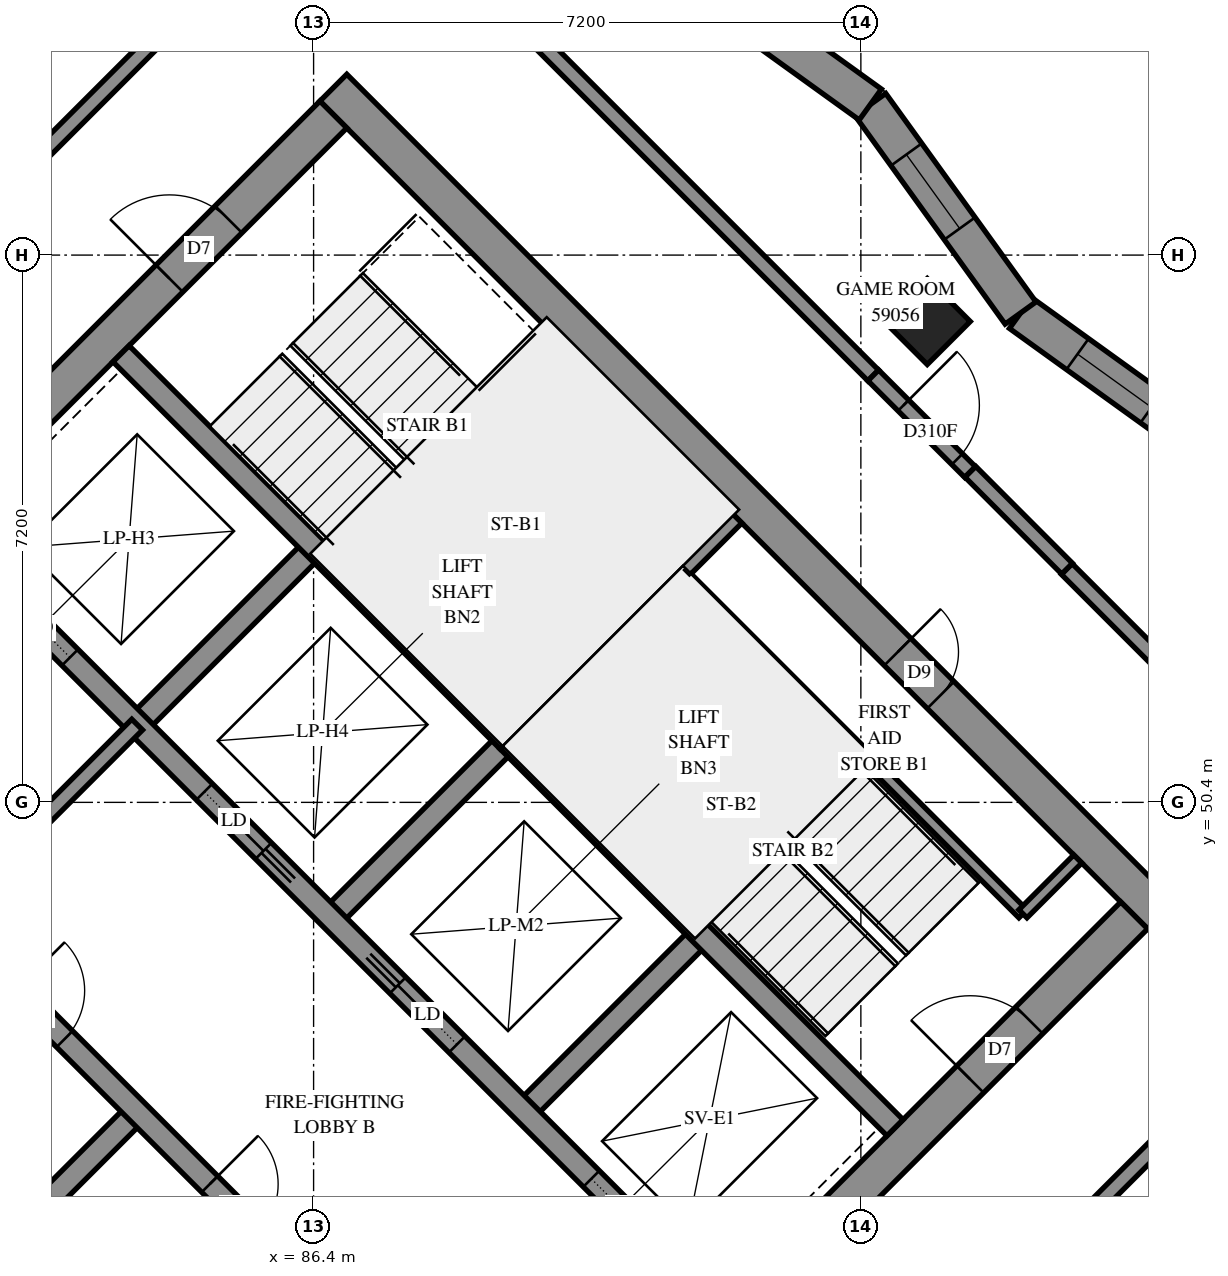
"""IFC4 building model, lengths in metres.
Left out: names, types, materials, properties, quantities, classifications, styles, units other than length and angle.
Written with IfcOpenShell. Run it as: python <this file> out.ifc"""

import sys

from ifc_helpers import new_model, si_unit, direction, frame, frame_2d, origin, origin_2d, place, context, subcontext, project, spatial, polyline, rectangle, outline, extrude, element, fill, save


model = new_model("IFC4")
c1 = context("Model", 3, precision=1e-05, world=origin(), true_north=direction((0.0, 1.0)))
c2 = subcontext(c1, "Body", "Model", "MODEL_VIEW")
j1 = project(units=[si_unit("LENGTHUNIT", "METRE"), si_unit("PLANEANGLEUNIT", "RADIAN")], contexts=[c1])
p1 = place(None, origin())
s1 = spatial("IfcSite", under=j1, at=p1, CompositionType="ELEMENT")
p2 = place(p1, origin())
s2 = spatial("IfcBuilding", under=s1, at=p2, CompositionType="ELEMENT")
p3 = place(p2, frame((0.0, 0.0, 216.8)))
s3 = spatial("IfcBuildingStorey", under=s2, at=p3, CompositionType="ELEMENT", Elevation=216.8)
p4 = place(p3, frame((94.474, 56.727, 0.0), z_axis=(0.0, 0.0, 1.0), x_axis=(0.7071067812, -0.7071067812, 0.0)))
e1 = element("IfcColumn", 1, at=p4, inside=s3, PredefinedType="COLUMN", context=c2, shape_type="SweptSolid", body=[
    extrude(rectangle(XDim=0.8, YDim=0.8, at=origin_2d()), origin(), (0.0, 0.0, 1.0), 3.1),
])
p5 = place(p3, frame((76.124, 49.267, -0.3), z_axis=(0.0, 0.0, 1.0), x_axis=(0.7071067812, -0.7071067812, 0.0)))
e2 = element("IfcWall", 2, at=p5, inside=s3, PredefinedType="SHEAR", context=c2, shape_type="SweptSolid", body=[
    extrude(rectangle(XDim=15.4, YDim=0.5, at=frame_2d((7.7, 0.0))), origin(), (0.0, 0.0, 1.0), 2.7),
])
p6 = place(p3, frame((86.66, 59.802, -0.3), z_axis=(0.0, 0.0, 1.0), x_axis=(0.7071067812, -0.7071067812, 0.0)))
e3 = element("IfcWall", 3, at=p6, inside=s3, PredefinedType="SHEAR", context=c2, shape_type="SweptSolid", body=[
    extrude(rectangle(XDim=15.4, YDim=0.5, at=frame_2d((7.7, 0.0))), origin(), (0.0, 0.0, 1.0), 2.7),
])
p7 = place(p6, frame((10.5, 0.0, 0.3)))
e4 = element("IfcOpeningElement", 4, at=p7, cuts=e3, PredefinedType="OPENING", context=c2, shape_type="SweptSolid", body=[
    extrude(rectangle(XDim=0.8, YDim=2.1, at=frame_2d((0.4, 1.05))), frame((0.0, 0.26, 0.0), z_axis=(0.0, -1.0, 0.0), x_axis=(1.0, 0.0, 0.0)), (0.0, 0.0, 1.0), 0.52),
])
p8 = place(p3, frame((76.478, 49.267, -0.3), z_axis=(0.0, 0.0, 1.0), x_axis=(0.7071067812, 0.7071067812, 0.0)))
e5 = element("IfcWall", 5, at=p8, inside=s3, PredefinedType="SHEAR", context=c2, shape_type="SweptSolid", body=[
    extrude(rectangle(XDim=14.4, YDim=0.5, at=frame_2d((7.2, 0.0))), origin(), (0.0, 0.0, 1.0), 2.7),
])
p9 = place(p8, frame((4.55, 0.0, 0.3)))
e6 = element("IfcOpeningElement", 6, at=p9, cuts=e5, PredefinedType="OPENING", context=c2, shape_type="SweptSolid", body=[
    extrude(rectangle(XDim=1.1, YDim=2.1, at=frame_2d((0.55, 1.05))), frame((0.0, 0.26, 0.0), z_axis=(0.0, -1.0, 0.0), x_axis=(1.0, 0.0, 0.0)), (0.0, 0.0, 1.0), 0.52),
])
p10 = place(p8, frame((11.35, 0.0, 0.3)))
e7 = element("IfcOpeningElement", 7, at=p10, cuts=e5, PredefinedType="OPENING", context=c2, shape_type="SweptSolid", body=[
    extrude(rectangle(XDim=1.1, YDim=2.1, at=frame_2d((0.55, 1.05))), frame((0.0, 0.26, 0.0), z_axis=(0.0, -1.0, 0.0), x_axis=(1.0, 0.0, 0.0)), (0.0, 0.0, 1.0), 0.52),
])
p11 = place(p3, frame((87.013, 38.731, -0.3), z_axis=(0.0, 0.0, 1.0), x_axis=(0.7071067812, 0.7071067812, 0.0)))
e8 = element("IfcWall", 8, at=p11, inside=s3, PredefinedType="SHEAR", context=c2, shape_type="SweptSolid", body=[
    extrude(rectangle(XDim=14.4, YDim=0.5, at=frame_2d((7.2, 0.0))), origin(), (0.0, 0.0, 1.0), 2.7),
])
p12 = place(p11, frame((4.55, 0.0, 0.3)))
e9 = element("IfcOpeningElement", 9, at=p12, cuts=e8, PredefinedType="OPENING", context=c2, shape_type="SweptSolid", body=[
    extrude(rectangle(XDim=1.1, YDim=2.1, at=frame_2d((0.55, 1.05))), frame((0.0, 0.26, 0.0), z_axis=(0.0, -1.0, 0.0), x_axis=(1.0, 0.0, 0.0)), (0.0, 0.0, 1.0), 0.52),
])
p13 = place(p11, frame((11.35, 0.0, 0.3)))
e10 = element("IfcOpeningElement", 10, at=p13, cuts=e8, PredefinedType="OPENING", context=c2, shape_type="SweptSolid", body=[
    extrude(rectangle(XDim=1.1, YDim=2.1, at=frame_2d((0.55, 1.05))), frame((0.0, 0.26, 0.0), z_axis=(0.0, -1.0, 0.0), x_axis=(1.0, 0.0, 0.0)), (0.0, 0.0, 1.0), 0.52),
])
p14 = place(p3, frame((84.079, 51.423, 0.0), z_axis=(0.0, 0.0, 1.0), x_axis=(0.7071219326, 0.7070916295, 0.0)))
e11 = element("IfcWall", 11, at=p14, inside=s3, PredefinedType="SOLIDWALL", context=c2, shape_type="SweptSolid", body=[
    extrude(rectangle(XDim=3.3, YDim=0.3, at=frame_2d((1.65, 0.0))), origin(), (0.0, 0.0, 1.0), 3.1),
])
p15 = place(p3, frame((81.746, 43.999, 0.0), z_axis=(0.0, 0.0, 1.0), x_axis=(0.7071067812, 0.7071067812, 0.0)))
e12 = element("IfcWall", 12, at=p15, inside=s3, PredefinedType="SOLIDWALL", context=c2, shape_type="SweptSolid", body=[
    extrude(rectangle(XDim=3.3, YDim=0.3, at=frame_2d((1.65, 0.0))), origin(), (0.0, 0.0, 1.0), 3.1),
])
for number, where, z_axis, x_axis in (
    (13, (86.625, 48.878, 0.0), (0.0, 0.0, 1.0), (0.707, 0.707, 0.0)),
    (14, (89.17, 46.332, 0.0), (0.0, 0.0, 1.0), (0.707, 0.707, 0.0)),
):
    element("IfcWall", number, at=place(p3, frame(where, z_axis=z_axis, x_axis=x_axis)), inside=s3, PredefinedType="SOLIDWALL", context=c2, shape_type="SweptSolid", body=[
        extrude(rectangle(XDim=3.3, YDim=0.3, at=frame_2d((1.65, 0.0))), origin(), (0.0, 0.0, 1.0), 3.1),
    ])
p16 = place(p3, frame((78.988, 51.423, 0.0), z_axis=(0.0, 0.0, 1.0), x_axis=(0.7071067812, -0.7071067812, 0.0)))
e15 = element("IfcWall", 15, at=p16, inside=s3, PredefinedType="SOLIDWALL", context=c2, shape_type="SweptSolid", body=[
    extrude(rectangle(XDim=14.4, YDim=0.3, at=frame_2d((7.2, 0.0))), origin(), (0.0, 0.0, 1.0), 3.1),
])
p17 = place(p16, frame((1.35, 0.0, 0.0)))
e16 = element("IfcOpeningElement", 16, at=p17, cuts=e15, PredefinedType="OPENING", context=c2, shape_type="SweptSolid", body=[
    extrude(rectangle(XDim=0.9, YDim=2.1, at=frame_2d((0.45, 1.05))), frame((0.0, 0.16, 0.0), z_axis=(0.0, -1.0, 0.0), x_axis=(1.0, 0.0, 0.0)), (0.0, 0.0, 1.0), 0.32),
])
p18 = place(p16, frame((4.95, 0.0, 0.0)))
e17 = element("IfcOpeningElement", 17, at=p18, cuts=e15, PredefinedType="OPENING", context=c2, shape_type="SweptSolid", body=[
    extrude(rectangle(XDim=0.9, YDim=2.1, at=frame_2d((0.45, 1.05))), frame((0.0, 0.16, 0.0), z_axis=(0.0, -1.0, 0.0), x_axis=(1.0, 0.0, 0.0)), (0.0, 0.0, 1.0), 0.32),
])
p19 = place(p16, frame((8.55, 0.0, 0.0)))
e18 = element("IfcOpeningElement", 18, at=p19, cuts=e15, PredefinedType="OPENING", context=c2, shape_type="SweptSolid", body=[
    extrude(rectangle(XDim=0.9, YDim=2.1, at=frame_2d((0.45, 1.05))), frame((0.0, 0.16, 0.0), z_axis=(0.0, -1.0, 0.0), x_axis=(1.0, 0.0, 0.0)), (0.0, 0.0, 1.0), 0.32),
])
p20 = place(p16, frame((12.05, 0.0, 0.0)))
e19 = element("IfcOpeningElement", 19, at=p20, cuts=e15, PredefinedType="OPENING", context=c2, shape_type="SweptSolid", body=[
    extrude(rectangle(XDim=1.1, YDim=2.1, at=frame_2d((0.55, 1.05))), frame((0.0, 0.16, 0.0), z_axis=(0.0, -1.0, 0.0), x_axis=(1.0, 0.0, 0.0)), (0.0, 0.0, 1.0), 0.32),
])
p21 = place(p3, frame((81.534, 53.969, 0.0), z_axis=(0.0, 0.0, 1.0), x_axis=(0.707103309, -0.7071102534, 0.0)))
e20 = element("IfcWall", 20, at=p21, inside=s3, PredefinedType="SOLIDWALL", context=c2, shape_type="SweptSolid", body=[
    extrude(rectangle(XDim=14.4, YDim=0.3, at=frame_2d((7.2, 0.0))), origin(), (0.0, 0.0, 1.0), 3.1),
])
p22 = place(p21, frame((1.25, 0.0, 0.0)))
e21 = element("IfcOpeningElement", 21, at=p22, cuts=e20, PredefinedType="OPENING", context=c2, shape_type="SweptSolid", body=[
    extrude(rectangle(XDim=1.1, YDim=2.1, at=frame_2d((0.55, 1.05))), frame((0.0, 0.16, 0.0), z_axis=(0.0, -1.0, 0.0), x_axis=(1.0, 0.0, 0.0)), (0.0, 0.0, 1.0), 0.32),
])
p23 = place(p21, frame((4.85, 0.0, 0.0)))
e22 = element("IfcOpeningElement", 22, at=p23, cuts=e20, PredefinedType="OPENING", context=c2, shape_type="SweptSolid", body=[
    extrude(rectangle(XDim=1.1, YDim=2.1, at=frame_2d((0.55, 1.05))), frame((0.0, 0.16, 0.0), z_axis=(0.0, -1.0, 0.0), x_axis=(1.0, 0.0, 0.0)), (0.0, 0.0, 1.0), 0.32),
])
p24 = place(p21, frame((8.45, 0.0, 0.0)))
e23 = element("IfcOpeningElement", 23, at=p24, cuts=e20, PredefinedType="OPENING", context=c2, shape_type="SweptSolid", body=[
    extrude(rectangle(XDim=1.1, YDim=2.1, at=frame_2d((0.55, 1.05))), frame((0.0, 0.16, 0.0), z_axis=(0.0, -1.0, 0.0), x_axis=(1.0, 0.0, 0.0)), (0.0, 0.0, 1.0), 0.32),
])
p25 = place(p21, frame((12.05, 0.0, 0.0)))
e24 = element("IfcOpeningElement", 24, at=p25, cuts=e20, PredefinedType="OPENING", context=c2, shape_type="SweptSolid", body=[
    extrude(rectangle(XDim=1.1, YDim=2.1, at=frame_2d((0.55, 1.05))), frame((0.0, 0.16, 0.0), z_axis=(0.0, -1.0, 0.0), x_axis=(1.0, 0.0, 0.0)), (0.0, 0.0, 1.0), 0.32),
])
for number, where, z_axis, x_axis in (
    (25, (83.867, 56.302, 0.0), (0.0, 0.0, 1.0), (0.707, -0.707, 0.0)),
    (26, (88.958, 51.211, 0.0), (0.0, 0.0, 1.0), (0.707, -0.707, 0.0)),
):
    element("IfcWall", number, at=place(p3, frame(where, z_axis=z_axis, x_axis=x_axis)), inside=s3, PredefinedType="SOLIDWALL", context=c2, shape_type="SweptSolid", body=[
        extrude(rectangle(XDim=7.2, YDim=0.3, at=frame_2d((3.6, 0.0))), origin(), (0.0, 0.0, 1.0), 3.1),
    ])
p26 = place(p3, frame((88.958, 51.211, 0.0), z_axis=(0.0, 0.0, 1.0), x_axis=(0.7071067812, 0.7071067812, 0.0)))
e27 = element("IfcWall", 27, at=p26, inside=s3, PredefinedType="SOLIDWALL", context=c2, shape_type="SweptSolid", body=[
    extrude(rectangle(XDim=4.2, YDim=0.3, at=frame_2d((2.1, 0.0))), origin(), (0.0, 0.0, 1.0), 3.1),
])
p27 = place(p3, frame((98.444, 54.862, 0.0), z_axis=(0.0, 0.0, 1.0), x_axis=(-0.8113121077, 0.5846132601, 0.0)))
e28 = element("IfcWall", 28, at=p27, inside=s3, PredefinedType="SOLIDWALL", context=c2, shape_type="SweptSolid", body=[
    extrude(outline(polyline([(-0.041, -0.25), (3.34, -0.25), (3.421, 0.25), (0.041, 0.25), (-0.041, -0.25)])), origin(), (0.0, 0.0, 1.0), 3.1),
])
p28 = place(p27, frame((1.257, 0.0, 0.45)))
e29 = element("IfcOpeningElement", 29, at=p28, cuts=e28, PredefinedType="OPENING", context=c2, shape_type="SweptSolid", body=[
    extrude(rectangle(XDim=1.2, YDim=2.5, at=frame_2d((0.6, 1.25))), frame((0.0, 0.26, 0.0), z_axis=(0.0, -1.0, 0.0), x_axis=(1.0, 0.0, 0.0)), (0.0, 0.0, 1.0), 0.52),
])
p29 = place(p3, frame((95.701, 56.838, 0.0), z_axis=(0.0, 0.0, 1.0), x_axis=(-0.5846132601, 0.8113121077, 0.0)))
e30 = element("IfcWall", 30, at=p29, inside=s3, PredefinedType="SOLIDWALL", context=c2, shape_type="SweptSolid", body=[
    extrude(outline(polyline([(0.041, -0.25), (3.421, -0.25), (3.34, 0.25), (-0.041, 0.25), (0.041, -0.25)])), origin(), (0.0, 0.0, 1.0), 3.1),
])
p30 = place(p29, frame((1.37, 0.0, 0.45)))
e31 = element("IfcOpeningElement", 31, at=p30, cuts=e30, PredefinedType="OPENING", context=c2, shape_type="SweptSolid", body=[
    extrude(rectangle(XDim=1.2, YDim=2.5, at=frame_2d((0.6, 1.25))), frame((0.0, 0.26, 0.0), z_axis=(0.0, -1.0, 0.0), x_axis=(1.0, 0.0, 0.0)), (0.0, 0.0, 1.0), 0.52),
])
p31 = place(p3, frame((93.725, 59.581, 0.0), z_axis=(0.0, 0.0, 1.0), x_axis=(-0.8113222169, 0.5845992306, 0.0)))
e32 = element("IfcWall", 32, at=p31, inside=s3, PredefinedType="SOLIDWALL", context=c2, shape_type="SweptSolid", body=[
    extrude(outline(polyline([(-0.041, -0.25), (3.34, -0.25), (3.421, 0.25), (0.041, 0.25), (-0.041, -0.25)])), origin(), (0.0, 0.0, 1.0), 3.1),
])
p32 = place(p31, frame((1.523, 0.0, 0.45)))
e33 = element("IfcOpeningElement", 33, at=p32, cuts=e32, PredefinedType="OPENING", context=c2, shape_type="SweptSolid", body=[
    extrude(rectangle(XDim=1.2, YDim=2.5, at=frame_2d((0.6, 1.25))), frame((0.0, 0.26, 0.0), z_axis=(0.0, -1.0, 0.0), x_axis=(1.0, 0.0, 0.0)), (0.0, 0.0, 1.0), 0.52),
])
p33 = place(p3, frame((91.313, 53.354, 0.0), z_axis=(0.0, 0.0, 1.0), x_axis=(0.7071147811, -0.7070987812, 0.0)))
e34 = element("IfcWall", 34, at=p33, inside=s3, PredefinedType="PARTITIONING", context=c2, shape_type="SweptSolid", body=[
    extrude(rectangle(XDim=6.25, YDim=0.15, at=frame_2d((3.125, 0.0))), origin(), (0.0, 0.0, 1.0), 3.1),
])
p34 = place(p3, frame((95.732, 48.934, 0.0), z_axis=(0.0, 0.0, 1.0), x_axis=(0.7071067812, 0.7071067812, 0.0)))
e35 = element("IfcWall", 35, at=p34, inside=s3, PredefinedType="PARTITIONING", context=c2, shape_type="SweptSolid", body=[
    extrude(rectangle(XDim=1.02, YDim=0.15, at=frame_2d((0.51, 0.0))), origin(), (0.0, 0.0, 1.0), 3.1),
])
p35 = place(p3, frame((81.534, 48.878, 0.0), z_axis=(0.0, 0.0, 1.0), x_axis=(0.707092892, 0.7071206701, 0.0)))
e36 = element("IfcWall", 36, at=p35, inside=s3, PredefinedType="PARTITIONING", context=c2, shape_type="SweptSolid", body=[
    extrude(rectangle(XDim=3.6, YDim=0.2, at=frame_2d((1.8, 0.0))), origin(), (0.0, 0.0, 1.0), 3.1),
])
p36 = place(p3, frame((93.625, 42.021, 0.0), z_axis=(0.0, 0.0, 1.0), x_axis=(0.7071067812, 0.7071067812, 0.0)))
e37 = element("IfcWall", 37, at=p36, inside=s3, PredefinedType="PARTITIONING", context=c2, shape_type="SweptSolid", body=[
    extrude(rectangle(XDim=9.998, YDim=0.2, at=frame_2d((4.999, 0.0))), origin(), (0.0, 0.0, 1.0), 3.1),
])
p37 = place(p36, frame((0.248, 0.0, 0.0)))
e38 = element("IfcOpeningElement", 38, at=p37, cuts=e37, PredefinedType="OPENING", context=c2, shape_type="SweptSolid", body=[
    extrude(rectangle(XDim=1.0, YDim=2.1, at=frame_2d((0.5, 1.05))), frame((0.0, 0.11, 0.0), z_axis=(0.0, -1.0, 0.0), x_axis=(1.0, 0.0, 0.0)), (0.0, 0.0, 1.0), 0.22),
])
p38 = place(p3, frame((79.799, 55.913, 0.0), z_axis=(0.0, 0.0, 1.0), x_axis=(0.7071067812, 0.7071067812, 0.0)))
e39 = element("IfcWall", 39, at=p38, inside=s3, PredefinedType="PARTITIONING", context=c2, shape_type="SweptSolid", body=[
    extrude(rectangle(XDim=9.95, YDim=0.2, at=frame_2d((4.975, 0.0))), origin(), (0.0, 0.0, 1.0), 3.1),
])
p39 = place(p38, frame((0.927, 0.0, 0.0)))
e40 = element("IfcOpeningElement", 40, at=p39, cuts=e39, PredefinedType="OPENING", context=c2, shape_type="SweptSolid", body=[
    extrude(rectangle(XDim=1.0, YDim=2.1, at=frame_2d((0.5, 1.05))), frame((0.0, 0.11, 0.0), z_axis=(0.0, -1.0, 0.0), x_axis=(1.0, 0.0, 0.0)), (0.0, 0.0, 1.0), 0.22),
])
p40 = place(p3, frame((86.835, 62.945, 0.0), z_axis=(0.0, 0.0, 1.0), x_axis=(0.7071067812, -0.7071067812, 0.0)))
e41 = element("IfcWall", 41, at=p40, inside=s3, PredefinedType="PARTITIONING", context=c2, shape_type="SweptSolid", body=[
    extrude(rectangle(XDim=9.798, YDim=0.2, at=frame_2d((4.899, 0.0))), origin(), (0.0, 0.0, 1.0), 3.1),
])
p41 = place(p3, frame((94.331, 41.313, 0.0), z_axis=(0.0, 0.0, 1.0), x_axis=(0.7072516979, 0.7069618347, 0.0)))
e42 = element("IfcWall", 42, at=p41, inside=s3, PredefinedType="PARTITIONING", context=c2, shape_type="SweptSolid", body=[
    extrude(rectangle(XDim=6.9, YDim=0.2, at=frame_2d((3.45, 0.0))), origin(), (0.0, 0.0, 1.0), 3.1),
])
p42 = place(p3, frame((96.309, 53.471, 0.0), z_axis=(0.0, 0.0, 1.0), x_axis=(0.7071067812, -0.7071067812, 0.0)))
e43 = element("IfcWall", 43, at=p42, inside=s3, PredefinedType="PARTITIONING", context=c2, shape_type="SweptSolid", body=[
    extrude(rectangle(XDim=6.2, YDim=0.2, at=frame_2d((3.1, 0.0))), origin(), (0.0, 0.0, 1.0), 3.1),
])
p43 = place(p3, frame((93.763, 56.017, 0.0), z_axis=(0.0, 0.0, 1.0), x_axis=(0.7076620277, -0.7065510983, 0.0)))
e44 = element("IfcWall", 44, at=p43, inside=s3, PredefinedType="PARTITIONING", context=c2, shape_type="SweptSolid", body=[
    extrude(rectangle(XDim=1.8, YDim=0.2, at=frame_2d((0.9, 0.0))), origin(), (0.0, 0.0, 1.0), 3.1),
])
p44 = place(p43, frame((0.559, 0.0, 0.0)))
e45 = element("IfcOpeningElement", 45, at=p44, cuts=e44, PredefinedType="OPENING", context=c2, shape_type="SweptSolid", body=[
    extrude(rectangle(XDim=1.0, YDim=2.1, at=frame_2d((0.5, 1.05))), frame((0.0, 0.11, 0.0), z_axis=(0.0, -1.0, 0.0), x_axis=(1.0, 0.0, 0.0)), (0.0, 0.0, 1.0), 0.22),
])
p45 = place(p3, frame((95.041, 54.749, 0.0), z_axis=(0.0, 0.0, 1.0), x_axis=(0.7065510983, -0.7076620277, 0.0)))
e46 = element("IfcWall", 46, at=p45, inside=s3, PredefinedType="PARTITIONING", context=c2, shape_type="SweptSolid", body=[
    extrude(rectangle(XDim=1.8, YDim=0.2, at=frame_2d((0.9, 0.0))), origin(), (0.0, 0.0, 1.0), 3.1),
])
p46 = place(p28, origin())
e47 = element("IfcWindow", 47, at=p46, inside=s3, PartitioningType="SINGLE_PANEL", PredefinedType="WINDOW", context=c2, shape_type="SweptSolid", body=[
    extrude(rectangle(XDim=1.2, YDim=2.5, at=frame_2d((0.6, 1.25))), frame((0.0, 0.18, 0.0), z_axis=(0.0, -1.0, 0.0), x_axis=(1.0, 0.0, 0.0)), (0.0, 0.0, 1.0), 0.06),
])
fill(e29, e47)
p47 = place(p30, origin())
e48 = element("IfcWindow", 48, at=p47, inside=s3, PartitioningType="SINGLE_PANEL", PredefinedType="WINDOW", context=c2, shape_type="SweptSolid", body=[
    extrude(rectangle(XDim=1.2, YDim=2.5, at=frame_2d((0.6, 1.25))), frame((0.0, 0.18, 0.0), z_axis=(0.0, -1.0, 0.0), x_axis=(1.0, 0.0, 0.0)), (0.0, 0.0, 1.0), 0.06),
])
fill(e31, e48)
p48 = place(p7, origin())
e49 = element("IfcDoor", 49, at=p48, inside=s3, OperationType="SINGLE_SWING_RIGHT", PredefinedType="DOOR", context=c2, shape_type="SweptSolid", body=[
    extrude(rectangle(XDim=0.8, YDim=2.1, at=frame_2d((0.4, 1.05))), frame((0.0, 0.025, 0.0), z_axis=(0.0, -1.0, 0.0), x_axis=(1.0, 0.0, 0.0)), (0.0, 0.0, 1.0), 0.05),
])
fill(e4, e49)
p49 = place(p10, origin())
e50 = element("IfcDoor", 50, at=p49, inside=s3, OperationType="SINGLE_SWING_LEFT", PredefinedType="DOOR", context=c2, shape_type="SweptSolid", body=[
    extrude(rectangle(XDim=1.1, YDim=2.1, at=frame_2d((0.55, 1.05))), frame((0.0, 0.025, 0.0), z_axis=(0.0, -1.0, 0.0), x_axis=(1.0, 0.0, 0.0)), (0.0, 0.0, 1.0), 0.05),
])
fill(e7, e50)
p50 = place(p13, origin())
e51 = element("IfcDoor", 51, at=p50, inside=s3, OperationType="SINGLE_SWING_RIGHT", PredefinedType="DOOR", context=c2, shape_type="SweptSolid", body=[
    extrude(rectangle(XDim=1.1, YDim=2.1, at=frame_2d((0.55, 1.05))), frame((0.0, 0.025, 0.0), z_axis=(0.0, -1.0, 0.0), x_axis=(1.0, 0.0, 0.0)), (0.0, 0.0, 1.0), 0.05),
])
fill(e10, e51)
p51 = place(p18, origin())
e52 = element("IfcDoor", 52, at=p51, inside=s3, OperationType="SINGLE_SWING_LEFT", PredefinedType="DOOR", context=c2, shape_type="SweptSolid", body=[
    extrude(rectangle(XDim=0.9, YDim=2.1, at=frame_2d((0.45, 1.05))), frame((0.0, 0.025, 0.0), z_axis=(0.0, -1.0, 0.0), x_axis=(1.0, 0.0, 0.0)), (0.0, 0.0, 1.0), 0.05),
])
fill(e17, e52)
p52 = place(p19, origin())
e53 = element("IfcDoor", 53, at=p52, inside=s3, OperationType="SINGLE_SWING_LEFT", PredefinedType="DOOR", context=c2, shape_type="SweptSolid", body=[
    extrude(rectangle(XDim=0.9, YDim=2.1, at=frame_2d((0.45, 1.05))), frame((0.0, 0.025, 0.0), z_axis=(0.0, -1.0, 0.0), x_axis=(1.0, 0.0, 0.0)), (0.0, 0.0, 1.0), 0.05),
])
fill(e18, e53)
p53 = place(p22, origin())
e54 = element("IfcDoor", 54, at=p53, inside=s3, OperationType="SLIDING_TO_LEFT", PredefinedType="DOOR", context=c2, shape_type="SweptSolid", body=[
    extrude(rectangle(XDim=1.1, YDim=2.1, at=frame_2d((0.55, 1.05))), frame((0.0, 0.025, 0.0), z_axis=(0.0, -1.0, 0.0), x_axis=(1.0, 0.0, 0.0)), (0.0, 0.0, 1.0), 0.05),
])
fill(e21, e54)
p54 = place(p23, origin())
e55 = element("IfcDoor", 55, at=p54, inside=s3, OperationType="SLIDING_TO_RIGHT", PredefinedType="DOOR", context=c2, shape_type="SweptSolid", body=[
    extrude(rectangle(XDim=1.1, YDim=2.1, at=frame_2d((0.55, 1.05))), frame((0.0, 0.025, 0.0), z_axis=(0.0, -1.0, 0.0), x_axis=(1.0, 0.0, 0.0)), (0.0, 0.0, 1.0), 0.05),
])
fill(e22, e55)
p55 = place(p24, origin())
e56 = element("IfcDoor", 56, at=p55, inside=s3, OperationType="SLIDING_TO_LEFT", PredefinedType="DOOR", context=c2, shape_type="SweptSolid", body=[
    extrude(rectangle(XDim=1.1, YDim=2.1, at=frame_2d((0.55, 1.05))), frame((0.0, 0.025, 0.0), z_axis=(0.0, -1.0, 0.0), x_axis=(1.0, 0.0, 0.0)), (0.0, 0.0, 1.0), 0.05),
])
fill(e23, e56)
p56 = place(p25, origin())
e57 = element("IfcDoor", 57, at=p56, inside=s3, OperationType="SLIDING_TO_RIGHT", PredefinedType="DOOR", context=c2, shape_type="SweptSolid", body=[
    extrude(rectangle(XDim=1.1, YDim=2.1, at=frame_2d((0.55, 1.05))), frame((0.0, 0.025, 0.0), z_axis=(0.0, -1.0, 0.0), x_axis=(1.0, 0.0, 0.0)), (0.0, 0.0, 1.0), 0.05),
])
fill(e24, e57)
p57 = place(p44, origin())
e58 = element("IfcDoor", 58, at=p57, inside=s3, OperationType="SINGLE_SWING_LEFT", PredefinedType="DOOR", context=c2, shape_type="SweptSolid", body=[
    extrude(rectangle(XDim=1.0, YDim=2.1, at=frame_2d((0.5, 1.05))), frame((0.0, 0.025, 0.0), z_axis=(0.0, -1.0, 0.0), x_axis=(1.0, 0.0, 0.0)), (0.0, 0.0, 1.0), 0.05),
])
fill(e45, e58)
save(model, sys.argv[1])
